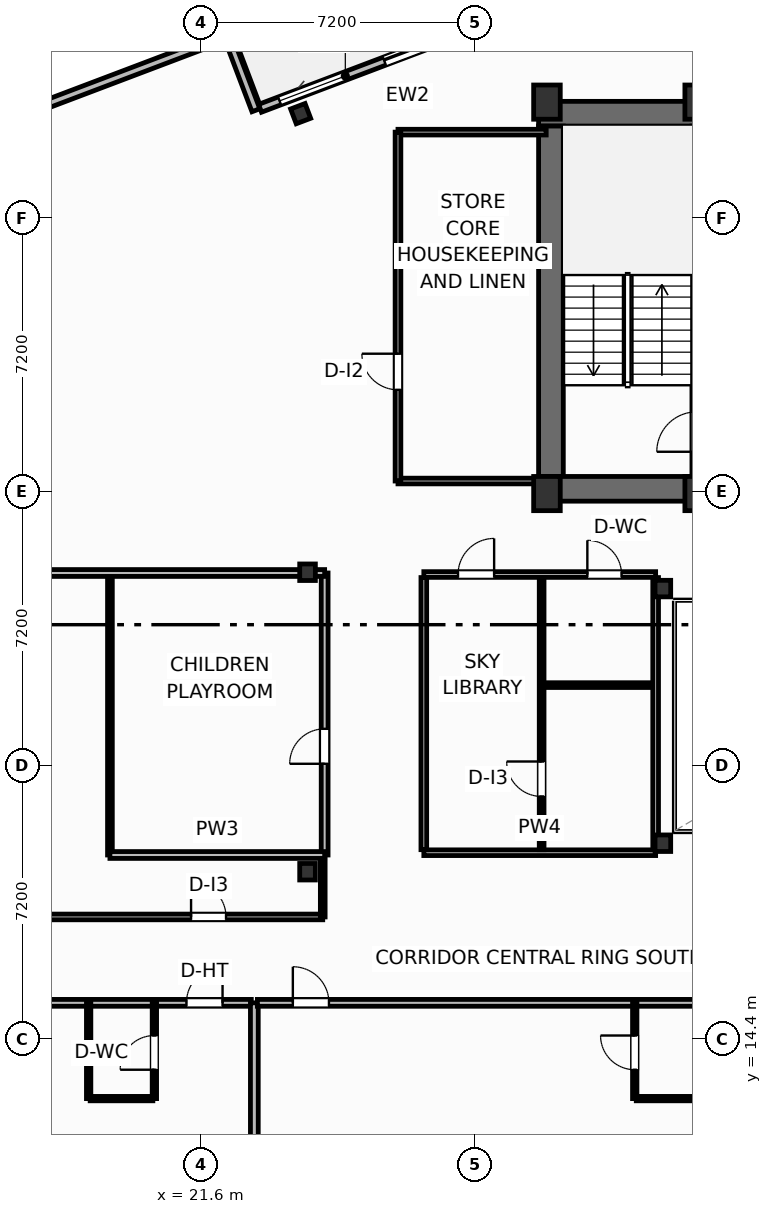
"""IFC4 building model, lengths in metres.
Left out: names, types, materials, properties, quantities, classifications, styles, units other than length and angle.
Written with IfcOpenShell. Run it as: python <this file> out.ifc"""

import sys

from ifc_helpers import new_model, si_unit, direction, frame, frame_2d, origin, origin_2d, place, context, subcontext, project, spatial, rectangle, i_section, extrude, element, fill, save


model = new_model("IFC4")
c1 = context("Model", 3, precision=1e-05, world=origin(), true_north=direction((0.0, 1.0)))
c2 = subcontext(c1, "Body", "Model", "MODEL_VIEW")
j1 = project(units=[si_unit("LENGTHUNIT", "METRE"), si_unit("PLANEANGLEUNIT", "RADIAN")], contexts=[c1])
p1 = place(None, origin())
s1 = spatial("IfcSite", under=j1, at=p1, CompositionType="ELEMENT")
p2 = place(p1, origin())
s2 = spatial("IfcBuilding", under=s1, at=p2, CompositionType="ELEMENT")
p3 = place(p2, frame((0.0, 0.0, 231.2)))
s3 = spatial("IfcBuildingStorey", under=s2, at=p3, CompositionType="ELEMENT", Elevation=231.2)
for number, where, z_axis, x_axis in (
    (1, (30.7, 28.75, 0.0), (0.0, 0.0, 1.0), (1.0, 0.0, 0.0)),
    (2, (34.68, 28.75, 0.0), (0.0, 0.0, 1.0), (1.0, 0.0, 0.0)),
    (3, (30.7, 39.05, 0.0), (0.0, 0.0, 1.0), (1.0, 0.0, 0.0)),
    (4, (34.68, 39.05, 0.0), (0.0, 0.0, 1.0), (1.0, 0.0, 0.0)),
):
    element("IfcColumn", number, at=place(p3, frame(where, z_axis=z_axis, x_axis=x_axis)), inside=s3, PredefinedType="COLUMN", context=c2, shape_type="SweptSolid", body=[
        extrude(rectangle(XDim=0.7, YDim=0.9, at=origin_2d()), origin(), (0.0, 0.0, 1.0), 3.7),
    ])
for number, where, z_axis, x_axis in (
    (5, (33.75, 19.55, 0.0), (0.0, 0.0, 1.0), (1.0, 0.0, 0.0)),
    (6, (33.75, 26.25, 0.0), (0.0, 0.0, 1.0), (1.0, 0.0, 0.0)),
    (7, (24.4, 18.8, 0.0), (0.0, 0.0, 1.0), (1.0, 0.0, 0.0)),
    (8, (24.4, 26.68, 0.0), (0.0, 0.0, 1.0), (1.0, 0.0, 0.0)),
):
    element("IfcColumn", number, at=place(p3, frame(where, z_axis=z_axis, x_axis=x_axis)), inside=s3, PredefinedType="COLUMN", context=c2, shape_type="SweptSolid", body=[
        extrude(i_section(OverallWidth=0.412, OverallDepth=0.435, WebThickness=0.036, FlangeThickness=0.057, FilletRadius=0.025, at=origin_2d()), origin(), (0.0, 0.0, 1.0), 3.7),
    ])
p4 = place(p3, frame((30.48, 38.745, 0.0), z_axis=(0.0, 0.0, 1.0), x_axis=(1.0, 0.0, 0.0)))
e9 = element("IfcWall", 9, at=p4, inside=s3, PredefinedType="SHEAR", context=c2, shape_type="SweptSolid", body=[
    extrude(rectangle(XDim=17.44, YDim=0.65, at=frame_2d((8.72, 0.0))), origin(), (0.0, 0.0, 1.0), 3.45),
])
p5 = place(p3, frame((30.805, 29.2, 0.0), z_axis=(0.0, 0.0, 1.0), x_axis=(0.0, 1.0, 0.0)))
e10 = element("IfcWall", 10, at=p5, inside=s3, PredefinedType="SHEAR", context=c2, shape_type="SweptSolid", body=[
    extrude(rectangle(XDim=9.22, YDim=0.65, at=frame_2d((4.61, 0.0))), origin(), (0.0, 0.0, 1.0), 3.45),
])
p6 = place(p3, frame((30.48, 28.875, 0.0), z_axis=(0.0, 0.0, 1.0), x_axis=(1.0, 0.0, 0.0)))
e11 = element("IfcWall", 11, at=p6, inside=s3, PredefinedType="SHEAR", context=c2, shape_type="SweptSolid", body=[
    extrude(rectangle(XDim=4.32, YDim=0.65, at=frame_2d((2.16, 0.0))), origin(), (0.0, 0.0, 1.0), 3.45),
])
p7 = place(p3, frame((34.64, 29.2, 0.0), z_axis=(0.0, 0.0, 1.0), x_axis=(0.0, 1.0, 0.0)))
e12 = element("IfcWall", 12, at=p7, inside=s3, PredefinedType="SHEAR", context=c2, shape_type="SweptSolid", body=[
    extrude(rectangle(XDim=9.22, YDim=0.25, at=frame_2d((4.61, 0.0))), origin(), (0.0, 0.0, 1.0), 3.45),
])
p8 = place(p7, frame((0.65, 0.0, 0.0)))
e13 = element("IfcOpeningElement", 13, at=p8, cuts=e12, PredefinedType="OPENING", context=c2, shape_type="SweptSolid", body=[
    extrude(rectangle(XDim=1.05, YDim=2.15, at=frame_2d((0.525, 1.075))), frame((0.0, 0.135, 0.0), z_axis=(0.0, -1.0, 0.0), x_axis=(1.0, 0.0, 0.0)), (0.0, 0.0, 1.0), 0.27),
])
p9 = place(p3, frame((24.219, 38.747, 0.0), z_axis=(0.0, 0.0, 1.0), x_axis=(0.935221751401, 0.354062530786, 0.0)))
e14 = element("IfcColumn", 14, at=p9, inside=s3, PredefinedType="COLUMN", context=c2, shape_type="SweptSolid", body=[
    extrude(i_section(OverallWidth=0.406, OverallDepth=0.416, WebThickness=0.03, FlangeThickness=0.048, FilletRadius=0.025, at=origin_2d()), origin(), (0.0, 0.0, 1.0), 3.7),
])
p10 = place(p3, frame((23.149, 38.887, 0.0), z_axis=(0.0, 0.0, 1.0), x_axis=(0.9352192676, 0.354069091436, 0.0)))
e15 = element("IfcWall", 15, at=p10, inside=s3, PredefinedType="SOLIDWALL", context=c2, shape_type="SweptSolid", body=[
    extrude(rectangle(XDim=6.0, YDim=0.22, at=frame_2d((3.0, 0.0))), origin(), (0.0, 0.0, 1.0), 2.73),
])
p11 = place(p10, frame((3.5, 0.0, 0.0)))
e16 = element("IfcOpeningElement", 16, at=p11, cuts=e15, PredefinedType="OPENING", context=c2, shape_type="SweptSolid", body=[
    extrude(rectangle(XDim=2.1, YDim=2.3, at=frame_2d((1.05, 1.15))), frame((0.0, 0.12, 0.0), z_axis=(0.0, -1.0, 0.0), x_axis=(1.0, 0.0, 0.0)), (0.0, 0.0, 1.0), 0.24),
])
p12 = place(p10, frame((0.55, 0.0, 0.75)))
e17 = element("IfcOpeningElement", 17, at=p12, cuts=e15, PredefinedType="OPENING", context=c2, shape_type="SweptSolid", body=[
    extrude(rectangle(XDim=1.85, YDim=1.75, at=frame_2d((0.925, 0.875))), frame((0.0, 0.12, 0.0), z_axis=(0.0, -1.0, 0.0), x_axis=(1.0, 0.0, 0.0)), (0.0, 0.0, 1.0), 0.24),
])
p13 = place(p3, frame((23.041, 38.835, 0.0), z_axis=(0.0, 0.0, 1.0), x_axis=(-0.354128469405, 0.935196785258, 0.0)))
e18 = element("IfcWall", 18, at=p13, inside=s3, PredefinedType="SOLIDWALL", context=c2, shape_type="SweptSolid", body=[
    extrude(rectangle(XDim=2.1, YDim=0.22, at=frame_2d((1.05, 0.0))), origin(), (0.0, 0.0, 1.0), 2.73),
])
p14 = place(p3, frame((22.18, 40.755, 0.0), z_axis=(0.0, 0.0, 1.0), x_axis=(-0.935223867561, -0.354056941104, 0.0)))
e19 = element("IfcWall", 19, at=p14, inside=s3, PredefinedType="SOLIDWALL", context=c2, shape_type="SweptSolid", body=[
    extrude(rectangle(XDim=17.647, YDim=0.22, at=frame_2d((8.823, 0.0))), origin(), (0.0, 0.0, 1.0), 2.73),
])
p15 = place(p14, frame((7.774, 0.0, 0.8)))
e20 = element("IfcOpeningElement", 20, at=p15, cuts=e19, PredefinedType="OPENING", context=c2, shape_type="SweptSolid", body=[
    extrude(rectangle(XDim=2.1, YDim=1.75, at=frame_2d((1.05, 0.875))), frame((0.0, 0.12, 0.0), z_axis=(0.0, -1.0, 0.0), x_axis=(1.0, 0.0, 0.0)), (0.0, 0.0, 1.0), 0.24),
])
p16 = place(p3, frame((6.908, 17.61, 0.0), z_axis=(0.0, 0.0, 1.0), x_axis=(1.0, 0.0, 0.0)))
e21 = element("IfcWall", 21, at=p16, inside=s3, PredefinedType="PARTITIONING", context=c2, shape_type="SweptSolid", body=[
    extrude(rectangle(XDim=17.892, YDim=0.15, at=frame_2d((8.946, 0.0))), origin(), (0.0, 0.0, 1.0), 3.45),
])
p17 = place(p16, frame((14.427, 0.0, 0.0)))
e22 = element("IfcOpeningElement", 22, at=p17, cuts=e21, PredefinedType="OPENING", context=c2, shape_type="SweptSolid", body=[
    extrude(rectangle(XDim=0.92, YDim=2.05, at=frame_2d((0.46, 1.025))), frame((0.0, 0.085, 0.0), z_axis=(0.0, -1.0, 0.0), x_axis=(1.0, 0.0, 0.0)), (0.0, 0.0, 1.0), 0.17),
])
p18 = place(p3, frame((24.8, 17.61, 0.0), z_axis=(0.0, 0.0, 1.0), x_axis=(0.0, 1.0, 0.0)))
e23 = element("IfcWall", 23, at=p18, inside=s3, PredefinedType="PARTITIONING", context=c2, shape_type="SweptSolid", body=[
    extrude(rectangle(XDim=1.63, YDim=0.125, at=frame_2d((0.815, 0.0))), origin(), (0.0, 0.0, 1.0), 2.739),
])
p19 = place(p3, frame((7.764, 15.35, 0.0), z_axis=(0.0, 0.0, 1.0), x_axis=(1.0, 0.0, 0.0)))
e24 = element("IfcWall", 24, at=p19, inside=s3, PredefinedType="PARTITIONING", context=c2, shape_type="SweptSolid", body=[
    extrude(rectangle(XDim=15.156, YDim=0.18, at=frame_2d((7.578, 0.0))), origin(), (0.0, 0.0, 1.0), 3.45),
])
p20 = place(p19, frame((13.45, 0.0, 0.0)))
e25 = element("IfcOpeningElement", 25, at=p20, cuts=e24, PredefinedType="OPENING", context=c2, shape_type="SweptSolid", body=[
    extrude(rectangle(XDim=0.95, YDim=2.15, at=frame_2d((0.475, 1.075))), frame((0.0, 0.1, 0.0), z_axis=(0.0, -1.0, 0.0), x_axis=(1.0, 0.0, 0.0)), (0.0, 0.0, 1.0), 0.2),
])
p21 = place(p3, frame((18.68, 12.83, 0.0), z_axis=(0.0, 0.0, 1.0), x_axis=(1.0, 0.0, 0.0)))
e26 = element("IfcWall", 26, at=p21, inside=s3, PredefinedType="PARTITIONING", context=c2, shape_type="SweptSolid", body=[
    extrude(rectangle(XDim=1.65, YDim=0.115, at=frame_2d((0.825, 0.0))), origin(), (0.0, 0.0, 1.0), 3.45),
])
p22 = place(p3, frame((20.37, 12.83, 0.0), z_axis=(0.0, 0.0, 1.0), x_axis=(0.0, 1.0, 0.0)))
e27 = element("IfcWall", 27, at=p22, inside=s3, PredefinedType="PARTITIONING", context=c2, shape_type="SweptSolid", body=[
    extrude(rectangle(XDim=2.52, YDim=0.115, at=frame_2d((1.26, 0.0))), origin(), (0.0, 0.0, 1.0), 3.45),
])
p23 = place(p22, frame((0.76, 0.0, 0.0)))
e28 = element("IfcOpeningElement", 28, at=p23, cuts=e27, PredefinedType="OPENING", context=c2, shape_type="SweptSolid", body=[
    extrude(rectangle(XDim=0.9, YDim=2.05, at=frame_2d((0.45, 1.025))), frame((0.0, 0.067, 0.0), z_axis=(0.0, -1.0, 0.0), x_axis=(1.0, 0.0, 0.0)), (0.0, 0.0, 1.0), 0.135),
])
p24 = place(p3, frame((18.64, 12.83, 0.0), z_axis=(0.0, 0.0, 1.0), x_axis=(0.0, 1.0, 0.0)))
e29 = element("IfcWall", 29, at=p24, inside=s3, PredefinedType="PARTITIONING", context=c2, shape_type="SweptSolid", body=[
    extrude(rectangle(XDim=2.52, YDim=0.115, at=frame_2d((1.26, 0.0))), origin(), (0.0, 0.0, 1.0), 3.45),
])
p25 = place(p3, frame((23.0, -2.71, 0.0), z_axis=(0.0, 0.0, 1.0), x_axis=(0.0, 1.0, 0.0)))
e30 = element("IfcWall", 30, at=p25, inside=s3, PredefinedType="PARTITIONING", context=c2, shape_type="SweptSolid", body=[
    extrude(rectangle(XDim=18.06, YDim=0.205, at=frame_2d((9.03, 0.0))), origin(), (0.0, 0.0, 1.0), 3.45),
])
p26 = place(p3, frame((23.08, 15.35, 0.0), z_axis=(0.0, 0.0, 1.0), x_axis=(1.0, 0.0, 0.0)))
e31 = element("IfcWall", 31, at=p26, inside=s3, PredefinedType="PARTITIONING", context=c2, shape_type="SweptSolid", body=[
    extrude(rectangle(XDim=12.34, YDim=0.18, at=frame_2d((6.17, 0.0))), origin(), (0.0, 0.0, 1.0), 3.45),
])
p27 = place(p26, frame((0.933, 0.0, 0.0)))
e32 = element("IfcOpeningElement", 32, at=p27, cuts=e31, PredefinedType="OPENING", context=c2, shape_type="SweptSolid", body=[
    extrude(rectangle(XDim=0.95, YDim=2.15, at=frame_2d((0.475, 1.075))), frame((0.0, 0.1, 0.0), z_axis=(0.0, -1.0, 0.0), x_axis=(1.0, 0.0, 0.0)), (0.0, 0.0, 1.0), 0.2),
])
p28 = place(p3, frame((33.05, 12.83, 0.0), z_axis=(0.0, 0.0, 1.0), x_axis=(1.0, 0.0, 0.0)))
e33 = element("IfcWall", 33, at=p28, inside=s3, PredefinedType="PARTITIONING", context=c2, shape_type="SweptSolid", body=[
    extrude(rectangle(XDim=2.15, YDim=0.115, at=frame_2d((1.075, 0.0))), origin(), (0.0, 0.0, 1.0), 3.45),
])
p29 = place(p3, frame((33.01, 12.83, 0.0), z_axis=(0.0, 0.0, 1.0), x_axis=(0.0, 1.0, 0.0)))
e34 = element("IfcWall", 34, at=p29, inside=s3, PredefinedType="PARTITIONING", context=c2, shape_type="SweptSolid", body=[
    extrude(rectangle(XDim=2.52, YDim=0.115, at=frame_2d((1.26, 0.0))), origin(), (0.0, 0.0, 1.0), 3.45),
])
p30 = place(p29, frame((0.76, 0.0, 0.0)))
e35 = element("IfcOpeningElement", 35, at=p30, cuts=e34, PredefinedType="OPENING", context=c2, shape_type="SweptSolid", body=[
    extrude(rectangle(XDim=0.9, YDim=2.05, at=frame_2d((0.45, 1.025))), frame((0.0, 0.067, 0.0), z_axis=(0.0, -1.0, 0.0), x_axis=(1.0, 0.0, 0.0)), (0.0, 0.0, 1.0), 0.135),
])
p31 = place(p3, frame((24.85, 19.24, 0.0), z_axis=(0.0, 0.0, 1.0), x_axis=(0.0, 1.0, 0.0)))
e36 = element("IfcWall", 36, at=p31, inside=s3, PredefinedType="PARTITIONING", context=c2, shape_type="SweptSolid", body=[
    extrude(rectangle(XDim=7.42, YDim=0.18, at=frame_2d((3.71, 0.0))), origin(), (0.0, 0.0, 1.0), 3.45),
])
p32 = place(p31, frame((2.4, 0.0, 0.0)))
e37 = element("IfcOpeningElement", 37, at=p32, cuts=e36, PredefinedType="OPENING", context=c2, shape_type="SweptSolid", body=[
    extrude(rectangle(XDim=0.92, YDim=2.05, at=frame_2d((0.46, 1.025))), frame((0.0, 0.1, 0.0), z_axis=(0.0, -1.0, 0.0), x_axis=(1.0, 0.0, 0.0)), (0.0, 0.0, 1.0), 0.2),
])
p33 = place(p3, frame((19.2, 19.24, 0.0), z_axis=(0.0, 0.0, 1.0), x_axis=(0.0, 1.0, 0.0)))
e38 = element("IfcWall", 38, at=p33, inside=s3, PredefinedType="PARTITIONING", context=c2, shape_type="SweptSolid", body=[
    extrude(rectangle(XDim=7.42, YDim=0.125, at=frame_2d((3.71, 0.0))), origin(), (0.0, 0.0, 1.0), 3.45),
])
p34 = place(p3, frame((19.2, 19.24, 0.0), z_axis=(0.0, 0.0, 1.0), x_axis=(1.0, 0.0, 0.0)))
e39 = element("IfcWall", 39, at=p34, inside=s3, PredefinedType="PARTITIONING", context=c2, shape_type="SweptSolid", body=[
    extrude(rectangle(XDim=5.65, YDim=0.18, at=frame_2d((2.825, 0.0))), origin(), (0.0, 0.0, 1.0), 3.45),
])
p35 = place(p3, frame((3.482, 26.66, 0.0), z_axis=(0.0, 0.0, 1.0), x_axis=(1.0, 0.0, 0.0)))
e40 = element("IfcWall", 40, at=p35, inside=s3, PredefinedType="PARTITIONING", context=c2, shape_type="SweptSolid", body=[
    extrude(rectangle(XDim=21.368, YDim=0.18, at=frame_2d((10.684, 0.0))), origin(), (0.0, 0.0, 1.0), 2.662),
])
p36 = place(p3, frame((27.46, 26.62, 0.0), z_axis=(0.0, 0.0, 1.0), x_axis=(1.0, 0.0, 0.0)))
e41 = element("IfcWall", 41, at=p36, inside=s3, PredefinedType="PARTITIONING", context=c2, shape_type="SweptSolid", body=[
    extrude(rectangle(XDim=6.1, YDim=0.15, at=frame_2d((3.05, 0.0))), origin(), (0.0, 0.0, 1.0), 2.662),
])
p37 = place(p36, frame((0.9, 0.0, 0.0)))
e42 = element("IfcOpeningElement", 42, at=p37, cuts=e41, PredefinedType="OPENING", context=c2, shape_type="SweptSolid", body=[
    extrude(rectangle(XDim=0.95, YDim=2.05, at=frame_2d((0.475, 1.025))), frame((0.0, 0.085, 0.0), z_axis=(0.0, -1.0, 0.0), x_axis=(1.0, 0.0, 0.0)), (0.0, 0.0, 1.0), 0.17),
])
p38 = place(p36, frame((4.303, 0.0, 0.0)))
e43 = element("IfcOpeningElement", 43, at=p38, cuts=e41, PredefinedType="OPENING", context=c2, shape_type="SweptSolid", body=[
    extrude(rectangle(XDim=0.9, YDim=2.05, at=frame_2d((0.45, 1.025))), frame((0.0, 0.085, 0.0), z_axis=(0.0, -1.0, 0.0), x_axis=(1.0, 0.0, 0.0)), (0.0, 0.0, 1.0), 0.17),
])
p39 = place(p3, frame((27.46, 19.3, 0.0), z_axis=(0.0, 0.0, 1.0), x_axis=(1.0, 0.0, 0.0)))
e44 = element("IfcWall", 44, at=p39, inside=s3, PredefinedType="PARTITIONING", context=c2, shape_type="SweptSolid", body=[
    extrude(rectangle(XDim=6.1, YDim=0.15, at=frame_2d((3.05, 0.0))), origin(), (0.0, 0.0, 1.0), 2.662),
])
p40 = place(p3, frame((30.56, 19.38, 0.0), z_axis=(0.0, 0.0, 1.0), x_axis=(0.0, 1.0, 0.0)))
e45 = element("IfcWall", 45, at=p40, inside=s3, PredefinedType="PARTITIONING", context=c2, shape_type="SweptSolid", body=[
    extrude(rectangle(XDim=7.16, YDim=0.125, at=frame_2d((3.58, 0.0))), origin(), (0.0, 0.0, 1.0), 3.45),
])
p41 = place(p40, frame((1.4, 0.0, 0.0)))
e46 = element("IfcOpeningElement", 46, at=p41, cuts=e45, PredefinedType="OPENING", context=c2, shape_type="SweptSolid", body=[
    extrude(rectangle(XDim=0.92, YDim=2.05, at=frame_2d((0.46, 1.025))), frame((0.0, 0.073, 0.0), z_axis=(0.0, -1.0, 0.0), x_axis=(1.0, 0.0, 0.0)), (0.0, 0.0, 1.0), 0.145),
])
p42 = place(p3, frame((30.64, 23.71, 0.0), z_axis=(0.0, 0.0, 1.0), x_axis=(1.0, 0.0, 0.0)))
e47 = element("IfcWall", 47, at=p42, inside=s3, PredefinedType="PARTITIONING", context=c2, shape_type="SweptSolid", body=[
    extrude(rectangle(XDim=2.88, YDim=0.125, at=frame_2d((1.44, 0.0))), origin(), (0.0, 0.0, 1.0), 3.45),
])
p43 = place(p3, frame((27.46, 19.38, 0.0), z_axis=(0.0, 0.0, 1.0), x_axis=(0.0, 1.0, 0.0)))
e48 = element("IfcWall", 48, at=p43, inside=s3, PredefinedType="PARTITIONING", context=c2, shape_type="SweptSolid", body=[
    extrude(rectangle(XDim=7.16, YDim=0.15, at=frame_2d((3.58, 0.0))), origin(), (0.0, 0.0, 1.0), 3.45),
])
p44 = place(p3, frame((33.56, 19.38, 0.0), z_axis=(0.0, 0.0, 1.0), x_axis=(0.0, 1.0, 0.0)))
e49 = element("IfcWall", 49, at=p44, inside=s3, PredefinedType="PARTITIONING", context=c2, shape_type="SweptSolid", body=[
    extrude(rectangle(XDim=7.16, YDim=0.15, at=frame_2d((3.58, 0.0))), origin(), (0.0, 0.0, 1.0), 2.824),
])
p45 = place(p3, frame((26.78, 29.08, 0.0), z_axis=(0.0, 0.0, 1.0), x_axis=(1.0, 0.0, 0.0)))
e50 = element("IfcWall", 50, at=p45, inside=s3, PredefinedType="PARTITIONING", context=c2, shape_type="SweptSolid", body=[
    extrude(rectangle(XDim=3.7, YDim=0.15, at=frame_2d((1.85, 0.0))), origin(), (0.0, 0.0, 1.0), 3.45),
])
p46 = place(p3, frame((26.78, 38.26, 0.0), z_axis=(0.0, 0.0, 1.0), x_axis=(1.0, 0.0, 0.0)))
e51 = element("IfcWall", 51, at=p46, inside=s3, PredefinedType="PARTITIONING", context=c2, shape_type="SweptSolid", body=[
    extrude(rectangle(XDim=3.9, YDim=0.15, at=frame_2d((1.95, 0.0))), origin(), (0.0, 0.0, 1.0), 3.45),
])
p47 = place(p3, frame((26.78, 29.08, 0.0), z_axis=(0.0, 0.0, 1.0), x_axis=(0.0, 1.0, 0.0)))
e52 = element("IfcWall", 52, at=p47, inside=s3, PredefinedType="PARTITIONING", context=c2, shape_type="SweptSolid", body=[
    extrude(rectangle(XDim=9.18, YDim=0.15, at=frame_2d((4.59, 0.0))), origin(), (0.0, 0.0, 1.0), 3.45),
])
p48 = place(p47, frame((2.4, 0.0, 0.0)))
e53 = element("IfcOpeningElement", 53, at=p48, cuts=e52, PredefinedType="OPENING", context=c2, shape_type="SweptSolid", body=[
    extrude(rectangle(XDim=0.95, YDim=2.05, at=frame_2d((0.475, 1.025))), frame((0.0, 0.085, 0.0), z_axis=(0.0, -1.0, 0.0), x_axis=(1.0, 0.0, 0.0)), (0.0, 0.0, 1.0), 0.17),
])
p49 = place(p11, origin())
e54 = element("IfcDoor", 54, at=p49, inside=s3, OperationType="SLIDING_TO_LEFT", PredefinedType="DOOR", context=c2, shape_type="SweptSolid", body=[
    extrude(rectangle(XDim=2.1, YDim=2.3, at=frame_2d((1.05, 1.15))), frame((0.0, 0.025, 0.0), z_axis=(0.0, -1.0, 0.0), x_axis=(1.0, 0.0, 0.0)), (0.0, 0.0, 1.0), 0.05),
])
fill(e16, e54)
p50 = place(p12, origin())
e55 = element("IfcWindow", 55, at=p50, inside=s3, PartitioningType="SINGLE_PANEL", PredefinedType="WINDOW", context=c2, shape_type="SweptSolid", body=[
    extrude(rectangle(XDim=1.85, YDim=1.75, at=frame_2d((0.925, 0.875))), frame((0.0, 0.03, 0.0), z_axis=(0.0, -1.0, 0.0), x_axis=(1.0, 0.0, 0.0)), (0.0, 0.0, 1.0), 0.06),
])
fill(e17, e55)
p51 = place(p17, origin())
e56 = element("IfcDoor", 56, at=p51, inside=s3, OperationType="SINGLE_SWING_LEFT", PredefinedType="DOOR", context=c2, shape_type="SweptSolid", body=[
    extrude(rectangle(XDim=0.92, YDim=2.05, at=frame_2d((0.46, 1.025))), frame((0.0, 0.025, 0.0), z_axis=(0.0, -1.0, 0.0), x_axis=(1.0, 0.0, 0.0)), (0.0, 0.0, 1.0), 0.05),
])
fill(e22, e56)
p52 = place(p20, origin())
e57 = element("IfcDoor", 57, at=p52, inside=s3, OperationType="SINGLE_SWING_RIGHT", PredefinedType="DOOR", context=c2, shape_type="SweptSolid", body=[
    extrude(rectangle(XDim=0.95, YDim=2.15, at=frame_2d((0.475, 1.075))), frame((0.0, 0.025, 0.0), z_axis=(0.0, -1.0, 0.0), x_axis=(1.0, 0.0, 0.0)), (0.0, 0.0, 1.0), 0.05),
])
fill(e25, e57)
p53 = place(p23, origin())
e58 = element("IfcDoor", 58, at=p53, inside=s3, OperationType="SINGLE_SWING_LEFT", PredefinedType="DOOR", context=c2, shape_type="SweptSolid", body=[
    extrude(rectangle(XDim=0.9, YDim=2.05, at=frame_2d((0.45, 1.025))), frame((0.0, 0.025, 0.0), z_axis=(0.0, -1.0, 0.0), x_axis=(1.0, 0.0, 0.0)), (0.0, 0.0, 1.0), 0.05),
])
fill(e28, e58)
p54 = place(p27, origin())
e59 = element("IfcDoor", 59, at=p54, inside=s3, OperationType="SINGLE_SWING_LEFT", PredefinedType="DOOR", context=c2, shape_type="SweptSolid", body=[
    extrude(rectangle(XDim=0.95, YDim=2.15, at=frame_2d((0.475, 1.075))), frame((0.0, 0.025, 0.0), z_axis=(0.0, -1.0, 0.0), x_axis=(1.0, 0.0, 0.0)), (0.0, 0.0, 1.0), 0.05),
])
fill(e32, e59)
p55 = place(p30, origin())
e60 = element("IfcDoor", 60, at=p55, inside=s3, OperationType="SINGLE_SWING_RIGHT", PredefinedType="DOOR", context=c2, shape_type="SweptSolid", body=[
    extrude(rectangle(XDim=0.9, YDim=2.05, at=frame_2d((0.45, 1.025))), frame((0.0, 0.025, 0.0), z_axis=(0.0, -1.0, 0.0), x_axis=(1.0, 0.0, 0.0)), (0.0, 0.0, 1.0), 0.05),
])
fill(e35, e60)
p56 = place(p32, origin())
e61 = element("IfcDoor", 61, at=p56, inside=s3, OperationType="SINGLE_SWING_LEFT", PredefinedType="DOOR", context=c2, shape_type="SweptSolid", body=[
    extrude(rectangle(XDim=0.92, YDim=2.05, at=frame_2d((0.46, 1.025))), frame((0.0, 0.025, 0.0), z_axis=(0.0, -1.0, 0.0), x_axis=(1.0, 0.0, 0.0)), (0.0, 0.0, 1.0), 0.05),
])
fill(e37, e61)
p57 = place(p37, origin())
e62 = element("IfcDoor", 62, at=p57, inside=s3, OperationType="SINGLE_SWING_RIGHT", PredefinedType="DOOR", context=c2, shape_type="SweptSolid", body=[
    extrude(rectangle(XDim=0.95, YDim=2.05, at=frame_2d((0.475, 1.025))), frame((0.0, 0.025, 0.0), z_axis=(0.0, -1.0, 0.0), x_axis=(1.0, 0.0, 0.0)), (0.0, 0.0, 1.0), 0.05),
])
fill(e42, e62)
p58 = place(p38, origin())
e63 = element("IfcDoor", 63, at=p58, inside=s3, OperationType="SINGLE_SWING_LEFT", PredefinedType="DOOR", context=c2, shape_type="SweptSolid", body=[
    extrude(rectangle(XDim=0.9, YDim=2.05, at=frame_2d((0.45, 1.025))), frame((0.0, 0.025, 0.0), z_axis=(0.0, -1.0, 0.0), x_axis=(1.0, 0.0, 0.0)), (0.0, 0.0, 1.0), 0.05),
])
fill(e43, e63)
p59 = place(p41, origin())
e64 = element("IfcDoor", 64, at=p59, inside=s3, OperationType="SINGLE_SWING_RIGHT", PredefinedType="DOOR", context=c2, shape_type="SweptSolid", body=[
    extrude(rectangle(XDim=0.92, YDim=2.05, at=frame_2d((0.46, 1.025))), frame((0.0, 0.025, 0.0), z_axis=(0.0, -1.0, 0.0), x_axis=(1.0, 0.0, 0.0)), (0.0, 0.0, 1.0), 0.05),
])
fill(e46, e64)
p60 = place(p48, origin())
e65 = element("IfcDoor", 65, at=p60, inside=s3, OperationType="SINGLE_SWING_RIGHT", PredefinedType="DOOR", context=c2, shape_type="SweptSolid", body=[
    extrude(rectangle(XDim=0.95, YDim=2.05, at=frame_2d((0.475, 1.025))), frame((0.0, 0.025, 0.0), z_axis=(0.0, -1.0, 0.0), x_axis=(1.0, 0.0, 0.0)), (0.0, 0.0, 1.0), 0.05),
])
fill(e53, e65)
save(model, sys.argv[1])
